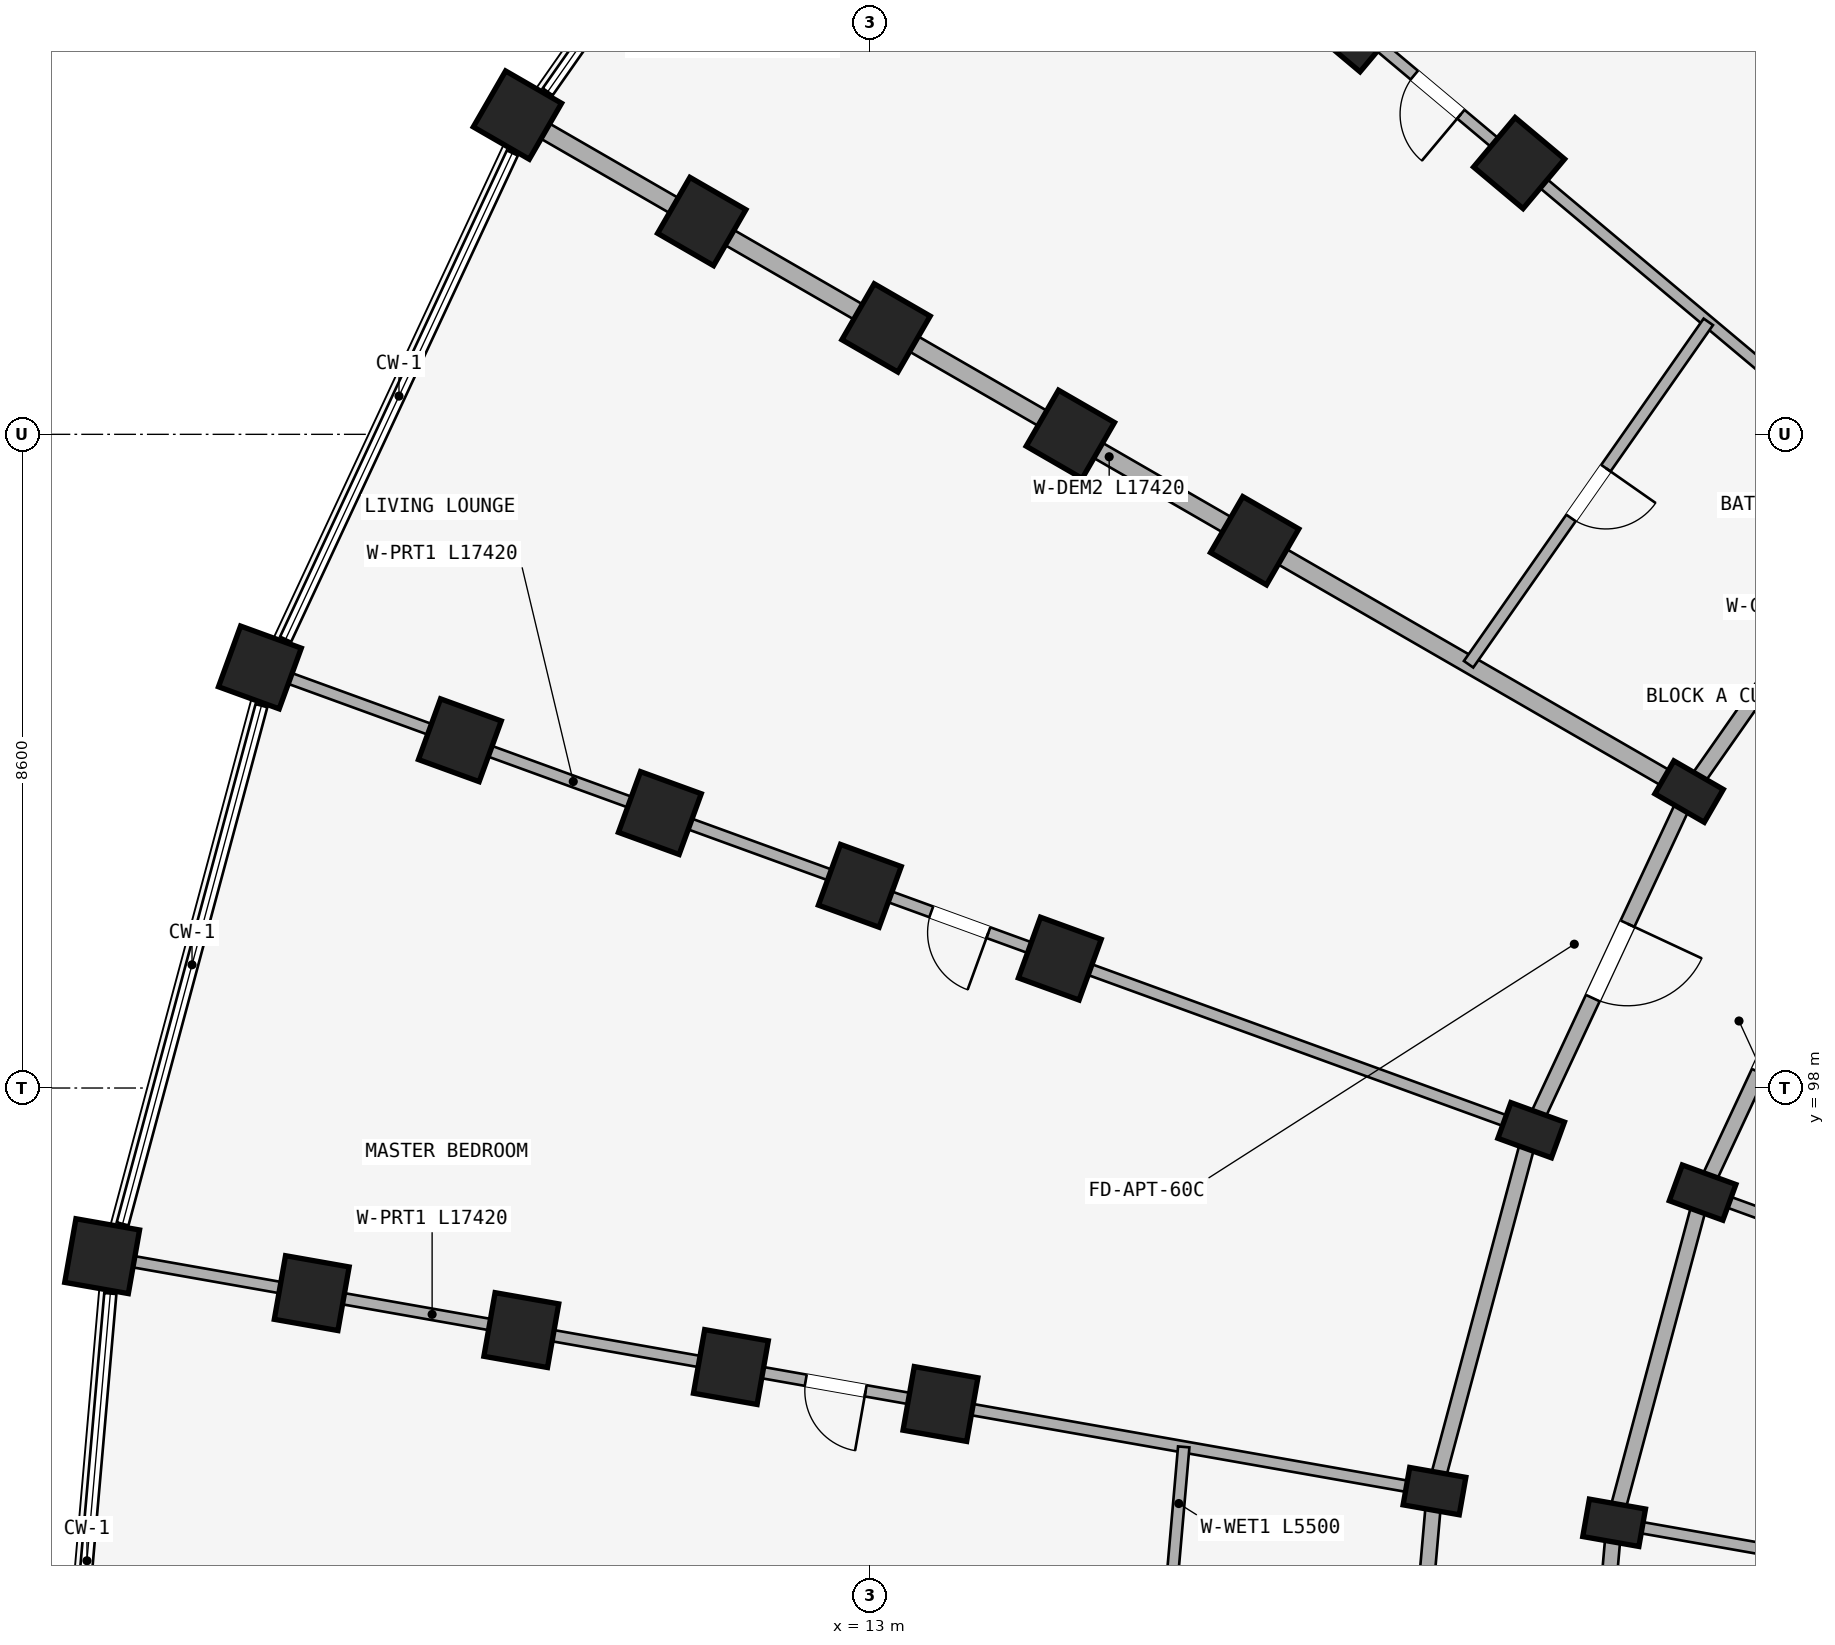
"""IFC4 building model, lengths in metres.
Left out: names, types, materials, properties, quantities, classifications, styles, units other than length and angle.
Written with IfcOpenShell. Run it as: python <this file> out.ifc"""

import sys

from ifc_helpers import new_model, si_unit, direction, frame, frame_2d, origin, origin_2d, place, context, subcontext, project, spatial, rectangle, extrude, element, fill, save


model = new_model("IFC4")
c1 = context("Model", 3, precision=1e-05, world=origin(), true_north=direction((0.0, 1.0)))
c2 = subcontext(c1, "Body", "Model", "MODEL_VIEW")
j1 = project(units=[si_unit("LENGTHUNIT", "METRE"), si_unit("PLANEANGLEUNIT", "RADIAN")], contexts=[c1])
p1 = place(None, origin())
s1 = spatial("IfcSite", under=j1, at=p1, CompositionType="ELEMENT")
p2 = place(p1, origin())
s2 = spatial("IfcBuilding", under=s1, at=p2, CompositionType="ELEMENT")
p3 = place(p2, frame((0.0, 0.0, 4.5)))
s3 = spatial("IfcBuildingStorey", under=s2, at=p3, CompositionType="ELEMENT", Elevation=4.5)
for number, where, z_axis, x_axis in (
    (1, (21.542, 110.169, 0.0), (0.0, 0.0, 1.0), (0.643, 0.766, 0.0)),
    (2, (19.397, 111.969, 0.0), (0.0, 0.0, 1.0), (0.643, 0.766, 0.0)),
):
    element("IfcColumn", number, at=place(p3, frame(where, z_axis=z_axis, x_axis=x_axis)), inside=s3, PredefinedType="COLUMN", context=c2, shape_type="SweptSolid", body=[
        extrude(rectangle(XDim=0.85, YDim=0.85, at=origin_2d()), origin(), (0.0, 0.0, 1.0), 3.98),
    ])
p4 = place(p3, frame((23.778, 101.9, 0.0), z_axis=(0.0, 0.0, 1.0), x_axis=(0.5, 0.866025403784, 0.0)))
e3 = element("IfcColumn", 3, at=p4, inside=s3, PredefinedType="COLUMN", context=c2, shape_type="SweptSolid", body=[
    extrude(rectangle(XDim=0.5, YDim=0.75, at=origin_2d()), origin(), (0.0, 0.0, 1.0), 3.98),
])
for number, where, z_axis, x_axis in (
    (4, (18.062, 105.2, 0.0), (0.0, 0.0, 1.0), (0.5, 0.866, 0.0)),
    (5, (15.637, 106.6, 0.0), (0.0, 0.0, 1.0), (0.5, 0.866, 0.0)),
    (6, (13.213, 108.0, 0.0), (0.0, 0.0, 1.0), (0.5, 0.866, 0.0)),
    (7, (10.788, 109.4, 0.0), (0.0, 0.0, 1.0), (0.5, 0.866, 0.0)),
    (8, (8.363, 110.8, 0.0), (0.0, 0.0, 1.0), (0.5, 0.866, 0.0)),
):
    element("IfcColumn", number, at=place(p3, frame(where, z_axis=z_axis, x_axis=x_axis)), inside=s3, PredefinedType="COLUMN", context=c2, shape_type="SweptSolid", body=[
        extrude(rectangle(XDim=0.85, YDim=0.85, at=origin_2d()), origin(), (0.0, 0.0, 1.0), 3.98),
    ])
for number, where, z_axis, x_axis in (
    (9, (23.956, 96.624, 0.0), (0.0, 0.0, 1.0), (0.342, 0.94, 0.0)),
    (10, (21.701, 97.445, 0.0), (0.0, 0.0, 1.0), (0.342, 0.94, 0.0)),
):
    element("IfcColumn", number, at=place(p3, frame(where, z_axis=z_axis, x_axis=x_axis)), inside=s3, PredefinedType="COLUMN", context=c2, shape_type="SweptSolid", body=[
        extrude(rectangle(XDim=0.5, YDim=0.75, at=origin_2d()), origin(), (0.0, 0.0, 1.0), 3.98),
    ])
for number, where, z_axis, x_axis in (
    (11, (15.499, 99.702, 0.0), (0.0, 0.0, 1.0), (0.342, 0.94, 0.0)),
    (12, (12.868, 100.66, 0.0), (0.0, 0.0, 1.0), (0.342, 0.94, 0.0)),
    (13, (10.236, 101.618, 0.0), (0.0, 0.0, 1.0), (0.342, 0.94, 0.0)),
    (14, (7.605, 102.575, 0.0), (0.0, 0.0, 1.0), (0.342, 0.94, 0.0)),
    (15, (4.974, 103.533, 0.0), (0.0, 0.0, 1.0), (0.342, 0.94, 0.0)),
):
    element("IfcColumn", number, at=place(p3, frame(where, z_axis=z_axis, x_axis=x_axis)), inside=s3, PredefinedType="COLUMN", context=c2, shape_type="SweptSolid", body=[
        extrude(rectangle(XDim=0.85, YDim=0.85, at=origin_2d()), origin(), (0.0, 0.0, 1.0), 3.98),
    ])
for number, where, z_axis, x_axis in (
    (16, (22.792, 92.28, 0.0), (0.0, 0.0, 1.0), (0.174, 0.985, 0.0)),
    (17, (20.428, 92.697, 0.0), (0.0, 0.0, 1.0), (0.174, 0.985, 0.0)),
):
    element("IfcColumn", number, at=place(p3, frame(where, z_axis=z_axis, x_axis=x_axis)), inside=s3, PredefinedType="COLUMN", context=c2, shape_type="SweptSolid", body=[
        extrude(rectangle(XDim=0.5, YDim=0.75, at=origin_2d()), origin(), (0.0, 0.0, 1.0), 3.98),
    ])
for number, where, z_axis, x_axis in (
    (18, (13.929, 93.843, 0.0), (0.0, 0.0, 1.0), (0.174, 0.985, 0.0)),
    (19, (11.171, 94.329, 0.0), (0.0, 0.0, 1.0), (0.174, 0.985, 0.0)),
    (20, (8.414, 94.815, 0.0), (0.0, 0.0, 1.0), (0.174, 0.985, 0.0)),
    (21, (5.656, 95.302, 0.0), (0.0, 0.0, 1.0), (0.174, 0.985, 0.0)),
    (22, (2.899, 95.788, 0.0), (0.0, 0.0, 1.0), (0.174, 0.985, 0.0)),
):
    element("IfcColumn", number, at=place(p3, frame(where, z_axis=z_axis, x_axis=x_axis)), inside=s3, PredefinedType="COLUMN", context=c2, shape_type="SweptSolid", body=[
        extrude(rectangle(XDim=0.85, YDim=0.85, at=origin_2d()), origin(), (0.0, 0.0, 1.0), 3.98),
    ])
p5 = place(p3, frame((26.598, 105.927, 0.0), z_axis=(0.0, 0.0, 1.0), x_axis=(-0.573592335331, -0.819140911474, 0.0)))
e23 = element("IfcWall", 23, at=p5, inside=s3, PredefinedType="STANDARD", context=c2, shape_type="SweptSolid", body=[
    extrude(rectangle(XDim=4.916, YDim=0.2, at=frame_2d((2.458, 0.0))), origin(), (0.0, 0.0, 1.0), 3.322),
])
p6 = place(p3, frame((25.856, 100.7, 0.0), z_axis=(0.0, 0.0, 1.0), x_axis=(-0.422617978463, -0.906307919131, 0.0)))
e24 = element("IfcWall", 24, at=p6, inside=s3, PredefinedType="STANDARD", context=c2, shape_type="SweptSolid", body=[
    extrude(rectangle(XDim=4.497, YDim=0.2, at=frame_2d((2.249, 0.0))), origin(), (0.0, 0.0, 1.0), 3.322),
])
p7 = place(p6, frame((1.749, 0.0, 0.0)))
e25 = element("IfcOpeningElement", 25, at=p7, cuts=e24, PredefinedType="OPENING", context=c2, shape_type="SweptSolid", body=[
    extrude(rectangle(XDim=1.0, YDim=2.15, at=frame_2d((0.5, 1.075))), frame((0.0, 0.11, 0.0), z_axis=(0.0, -1.0, 0.0), x_axis=(1.0, 0.0, 0.0)), (0.0, 0.0, 1.0), 0.22),
])
p8 = place(p3, frame((23.778, 101.9, 0.0), z_axis=(0.0, 0.0, 1.0), x_axis=(-0.422629854778, -0.906302381024, 0.0)))
e26 = element("IfcWall", 26, at=p8, inside=s3, PredefinedType="STANDARD", context=c2, shape_type="SweptSolid", body=[
    extrude(rectangle(XDim=4.915, YDim=0.2, at=frame_2d((2.458, 0.0))), origin(), (0.0, 0.0, 1.0), 3.322),
])
p9 = place(p8, frame((1.918, 0.0, 0.0)))
e27 = element("IfcOpeningElement", 27, at=p9, cuts=e26, PredefinedType="OPENING", context=c2, shape_type="SweptSolid", body=[
    extrude(rectangle(XDim=1.08, YDim=2.15, at=frame_2d((0.54, 1.075))), frame((0.0, 0.11, 0.0), z_axis=(0.0, -1.0, 0.0), x_axis=(1.0, 0.0, 0.0)), (0.0, 0.0, 1.0), 0.22),
])
p10 = place(p3, frame((23.956, 96.624, 0.0), z_axis=(0.0, 0.0, 1.0), x_axis=(-0.258787642463, -0.965934240054, 0.0)))
e28 = element("IfcWall", 28, at=p10, inside=s3, PredefinedType="STANDARD", context=c2, shape_type="SweptSolid", body=[
    extrude(rectangle(XDim=4.497, YDim=0.2, at=frame_2d((2.249, 0.0))), origin(), (0.0, 0.0, 1.0), 3.322),
])
p11 = place(p3, frame((21.701, 97.445, 0.0), z_axis=(0.0, 0.0, 1.0), x_axis=(-0.258803112091, -0.965930095386, 0.0)))
e29 = element("IfcWall", 29, at=p11, inside=s3, PredefinedType="STANDARD", context=c2, shape_type="SweptSolid", body=[
    extrude(rectangle(XDim=4.916, YDim=0.2, at=frame_2d((2.458, 0.0))), origin(), (0.0, 0.0, 1.0), 3.322),
])
p12 = place(p3, frame((22.792, 92.28, 0.0), z_axis=(0.0, 0.0, 1.0), x_axis=(-0.087187153726, -0.996191949488, 0.0)))
e30 = element("IfcWall", 30, at=p12, inside=s3, PredefinedType="STANDARD", context=c2, shape_type="SweptSolid", body=[
    extrude(rectangle(XDim=4.497, YDim=0.2, at=frame_2d((2.249, 0.0))), origin(), (0.0, 0.0, 1.0), 3.322),
])
p13 = place(p3, frame((20.428, 92.697, 0.0), z_axis=(0.0, 0.0, 1.0), x_axis=(-0.087167566415, -0.996193663584, 0.0)))
e31 = element("IfcWall", 31, at=p13, inside=s3, PredefinedType="STANDARD", context=c2, shape_type="SweptSolid", body=[
    extrude(rectangle(XDim=4.916, YDim=0.2, at=frame_2d((2.458, 0.0))), origin(), (0.0, 0.0, 1.0), 3.322),
])
p14 = place(p3, frame((30.009, 109.479, 0.0), z_axis=(0.0, 0.0, 1.0), x_axis=(-0.642784757967, 0.766046835987, 0.0)))
e32 = element("IfcWall", 32, at=p14, inside=s3, PredefinedType="PARTITIONING", context=c2, shape_type="SweptSolid", body=[
    extrude(rectangle(XDim=17.42, YDim=0.15, at=frame_2d((8.71, 0.0))), origin(), (0.0, 0.0, 1.0), 3.322),
])
p15 = place(p14, frame((7.5, 0.0, 0.0)))
e33 = element("IfcOpeningElement", 33, at=p15, cuts=e32, PredefinedType="OPENING", context=c2, shape_type="SweptSolid", body=[
    extrude(rectangle(XDim=0.8, YDim=2.1, at=frame_2d((0.4, 1.05))), frame((0.0, 0.085, 0.0), z_axis=(0.0, -1.0, 0.0), x_axis=(1.0, 0.0, 0.0)), (0.0, 0.0, 1.0), 0.17),
])
p16 = place(p3, frame((26.521, 105.991, 0.0), z_axis=(0.0, 0.0, 1.0), x_axis=(-0.766046835987, 0.642784757967, 0.0)))
e34 = element("IfcWall", 34, at=p16, inside=s3, PredefinedType="PARTITIONING", context=c2, shape_type="SweptSolid", body=[
    extrude(rectangle(XDim=17.42, YDim=0.15, at=frame_2d((8.71, 0.0))), origin(), (0.0, 0.0, 1.0), 3.322),
])
p17 = place(p16, frame((7.5, 0.0, 0.0)))
e35 = element("IfcOpeningElement", 35, at=p17, cuts=e34, PredefinedType="OPENING", context=c2, shape_type="SweptSolid", body=[
    extrude(rectangle(XDim=0.8, YDim=2.1, at=frame_2d((0.4, 1.05))), frame((0.0, 0.085, 0.0), z_axis=(0.0, -1.0, 0.0), x_axis=(1.0, 0.0, 0.0)), (0.0, 0.0, 1.0), 0.17),
])
p18 = place(p3, frame((23.691, 101.95, 0.0), z_axis=(0.0, 0.0, 1.0), x_axis=(-0.866026648973, 0.499997843263, 0.0)))
e36 = element("IfcWall", 36, at=p18, inside=s3, PredefinedType="STANDARD", context=c2, shape_type="SweptSolid", body=[
    extrude(rectangle(XDim=17.42, YDim=0.23, at=frame_2d((8.71, 0.0))), origin(), (0.0, 0.0, 1.0), 3.322),
])
p19 = place(p3, frame((30.346, 94.298, 0.0), z_axis=(0.0, 0.0, 1.0), x_axis=(-0.939696231917, 0.342010221662, 0.0)))
e37 = element("IfcWall", 37, at=p19, inside=s3, PredefinedType="PARTITIONING", context=c2, shape_type="SweptSolid", body=[
    extrude(rectangle(XDim=6.75, YDim=0.15, at=frame_2d((3.375, 0.0))), origin(), (0.0, 0.0, 1.0), 3.322),
])
p20 = place(p19, frame((3.262, 0.0, 0.0)))
e38 = element("IfcOpeningElement", 38, at=p20, cuts=e37, PredefinedType="OPENING", context=c2, shape_type="SweptSolid", body=[
    extrude(rectangle(XDim=0.9, YDim=2.1, at=frame_2d((0.45, 1.05))), frame((0.0, 0.085, 0.0), z_axis=(0.0, -1.0, 0.0), x_axis=(1.0, 0.0, 0.0)), (0.0, 0.0, 1.0), 0.17),
])
p21 = place(p3, frame((21.607, 97.479, 0.0), z_axis=(0.0, 0.0, 1.0), x_axis=(-0.939691901159, 0.342022120477, 0.0)))
e39 = element("IfcWall", 39, at=p21, inside=s3, PredefinedType="PARTITIONING", context=c2, shape_type="SweptSolid", body=[
    extrude(rectangle(XDim=17.42, YDim=0.15, at=frame_2d((8.71, 0.0))), origin(), (0.0, 0.0, 1.0), 3.322),
])
p22 = place(p21, frame((7.5, 0.0, 0.0)))
e40 = element("IfcOpeningElement", 40, at=p22, cuts=e39, PredefinedType="OPENING", context=c2, shape_type="SweptSolid", body=[
    extrude(rectangle(XDim=0.8, YDim=2.1, at=frame_2d((0.4, 1.05))), frame((0.0, 0.085, 0.0), z_axis=(0.0, -1.0, 0.0), x_axis=(1.0, 0.0, 0.0)), (0.0, 0.0, 1.0), 0.17),
])
p23 = place(p3, frame((29.489, 91.099, 0.0), z_axis=(0.0, 0.0, 1.0), x_axis=(-0.984807944945, 0.173647089161, 0.0)))
e41 = element("IfcWall", 41, at=p23, inside=s3, PredefinedType="PARTITIONING", context=c2, shape_type="SweptSolid", body=[
    extrude(rectangle(XDim=6.75, YDim=0.15, at=frame_2d((3.375, 0.0))), origin(), (0.0, 0.0, 1.0), 3.322),
])
p24 = place(p23, frame((3.242, 0.0, 0.0)))
e42 = element("IfcOpeningElement", 42, at=p24, cuts=e41, PredefinedType="OPENING", context=c2, shape_type="SweptSolid", body=[
    extrude(rectangle(XDim=0.94, YDim=2.1, at=frame_2d((0.47, 1.05))), frame((0.0, 0.085, 0.0), z_axis=(0.0, -1.0, 0.0), x_axis=(1.0, 0.0, 0.0)), (0.0, 0.0, 1.0), 0.17),
])
p25 = place(p3, frame((20.33, 92.714, 0.0), z_axis=(0.0, 0.0, 1.0), x_axis=(-0.984808098809, 0.173646216546, 0.0)))
e43 = element("IfcWall", 43, at=p25, inside=s3, PredefinedType="PARTITIONING", context=c2, shape_type="SweptSolid", body=[
    extrude(rectangle(XDim=17.42, YDim=0.15, at=frame_2d((8.71, 0.0))), origin(), (0.0, 0.0, 1.0), 3.322),
])
p26 = place(p25, frame((7.5, 0.0, 0.0)))
e44 = element("IfcOpeningElement", 44, at=p26, cuts=e43, PredefinedType="OPENING", context=c2, shape_type="SweptSolid", body=[
    extrude(rectangle(XDim=0.8, YDim=2.1, at=frame_2d((0.4, 1.05))), frame((0.0, 0.085, 0.0), z_axis=(0.0, -1.0, 0.0), x_axis=(1.0, 0.0, 0.0)), (0.0, 0.0, 1.0), 0.17),
])
p27 = place(p3, frame((24.031, 108.08, 0.0), z_axis=(0.0, 0.0, 1.0), x_axis=(-0.573569599955, -0.819156831143, 0.0)))
e45 = element("IfcWall", 45, at=p27, inside=s3, PredefinedType="PLUMBINGWALL", context=c2, shape_type="SweptSolid", body=[
    extrude(rectangle(XDim=5.5, YDim=0.15, at=frame_2d((2.75, 0.0))), origin(), (0.0, 0.0, 1.0), 3.322),
])
p28 = place(p27, frame((2.35, 0.0, 0.0)))
e46 = element("IfcOpeningElement", 46, at=p28, cuts=e45, PredefinedType="OPENING", context=c2, shape_type="SweptSolid", body=[
    extrude(rectangle(XDim=0.8, YDim=2.1, at=frame_2d((0.4, 1.05))), frame((0.0, 0.085, 0.0), z_axis=(0.0, -1.0, 0.0), x_axis=(1.0, 0.0, 0.0)), (0.0, 0.0, 1.0), 0.17),
])
p29 = place(p3, frame((17.129, 93.279, 0.0), z_axis=(0.0, 0.0, 1.0), x_axis=(-0.087188978393, -0.996191789791, 0.0)))
e47 = element("IfcWall", 47, at=p29, inside=s3, PredefinedType="PLUMBINGWALL", context=c2, shape_type="SweptSolid", body=[
    extrude(rectangle(XDim=5.5, YDim=0.15, at=frame_2d((2.75, 0.0))), origin(), (0.0, 0.0, 1.0), 3.322),
])
p30 = place(p29, frame((2.35, 0.0, 0.0)))
e48 = element("IfcOpeningElement", 48, at=p30, cuts=e47, PredefinedType="OPENING", context=c2, shape_type="SweptSolid", body=[
    extrude(rectangle(XDim=0.8, YDim=2.1, at=frame_2d((0.4, 1.05))), frame((0.0, 0.085, 0.0), z_axis=(0.0, -1.0, 0.0), x_axis=(1.0, 0.0, 0.0)), (0.0, 0.0, 1.0), 0.17),
])
p31 = place(p17, frame((0.8, 0.0, 0.0), z_axis=(0.0, 0.0, 1.0), x_axis=(-1.0, 0.0, 0.0)))
e49 = element("IfcDoor", 49, at=p31, inside=s3, OperationType="SINGLE_SWING_RIGHT", PredefinedType="DOOR", context=c2, shape_type="SweptSolid", body=[
    extrude(rectangle(XDim=0.8, YDim=2.1, at=frame_2d((0.4, 1.05))), frame((0.0, 0.025, 0.0), z_axis=(0.0, -1.0, 0.0), x_axis=(1.0, 0.0, 0.0)), (0.0, 0.0, 1.0), 0.05),
])
fill(e35, e49)
p32 = place(p22, frame((0.8, 0.0, 0.0), z_axis=(0.0, 0.0, 1.0), x_axis=(-1.0, 0.0, 0.0)))
e50 = element("IfcDoor", 50, at=p32, inside=s3, OperationType="SINGLE_SWING_RIGHT", PredefinedType="DOOR", context=c2, shape_type="SweptSolid", body=[
    extrude(rectangle(XDim=0.8, YDim=2.1, at=frame_2d((0.4, 1.05))), frame((0.0, 0.025, 0.0), z_axis=(0.0, -1.0, 0.0), x_axis=(1.0, 0.0, 0.0)), (0.0, 0.0, 1.0), 0.05),
])
fill(e40, e50)
p33 = place(p26, frame((0.8, 0.0, 0.0), z_axis=(0.0, 0.0, 1.0), x_axis=(-1.0, 0.0, 0.0)))
e51 = element("IfcDoor", 51, at=p33, inside=s3, OperationType="SINGLE_SWING_RIGHT", PredefinedType="DOOR", context=c2, shape_type="SweptSolid", body=[
    extrude(rectangle(XDim=0.8, YDim=2.1, at=frame_2d((0.4, 1.05))), frame((0.0, 0.025, 0.0), z_axis=(0.0, -1.0, 0.0), x_axis=(1.0, 0.0, 0.0)), (0.0, 0.0, 1.0), 0.05),
])
fill(e44, e51)
p34 = place(p28, frame((0.8, 0.0, 0.0), z_axis=(0.0, 0.0, 1.0), x_axis=(-1.0, 0.0, 0.0)))
e52 = element("IfcDoor", 52, at=p34, inside=s3, OperationType="SINGLE_SWING_RIGHT", PredefinedType="DOOR", context=c2, shape_type="SweptSolid", body=[
    extrude(rectangle(XDim=0.8, YDim=2.1, at=frame_2d((0.4, 1.05))), frame((0.0, 0.025, 0.0), z_axis=(0.0, -1.0, 0.0), x_axis=(1.0, 0.0, 0.0)), (0.0, 0.0, 1.0), 0.05),
])
fill(e46, e52)
p35 = place(p9, origin())
e53 = element("IfcDoor", 53, at=p35, inside=s3, OperationType="SINGLE_SWING_LEFT", PredefinedType="DOOR", context=c2, shape_type="SweptSolid", body=[
    extrude(rectangle(XDim=1.08, YDim=2.15, at=frame_2d((0.54, 1.075))), frame((0.0, 0.025, 0.0), z_axis=(0.0, -1.0, 0.0), x_axis=(1.0, 0.0, 0.0)), (0.0, 0.0, 1.0), 0.05),
])
fill(e27, e53)
save(model, sys.argv[1])
